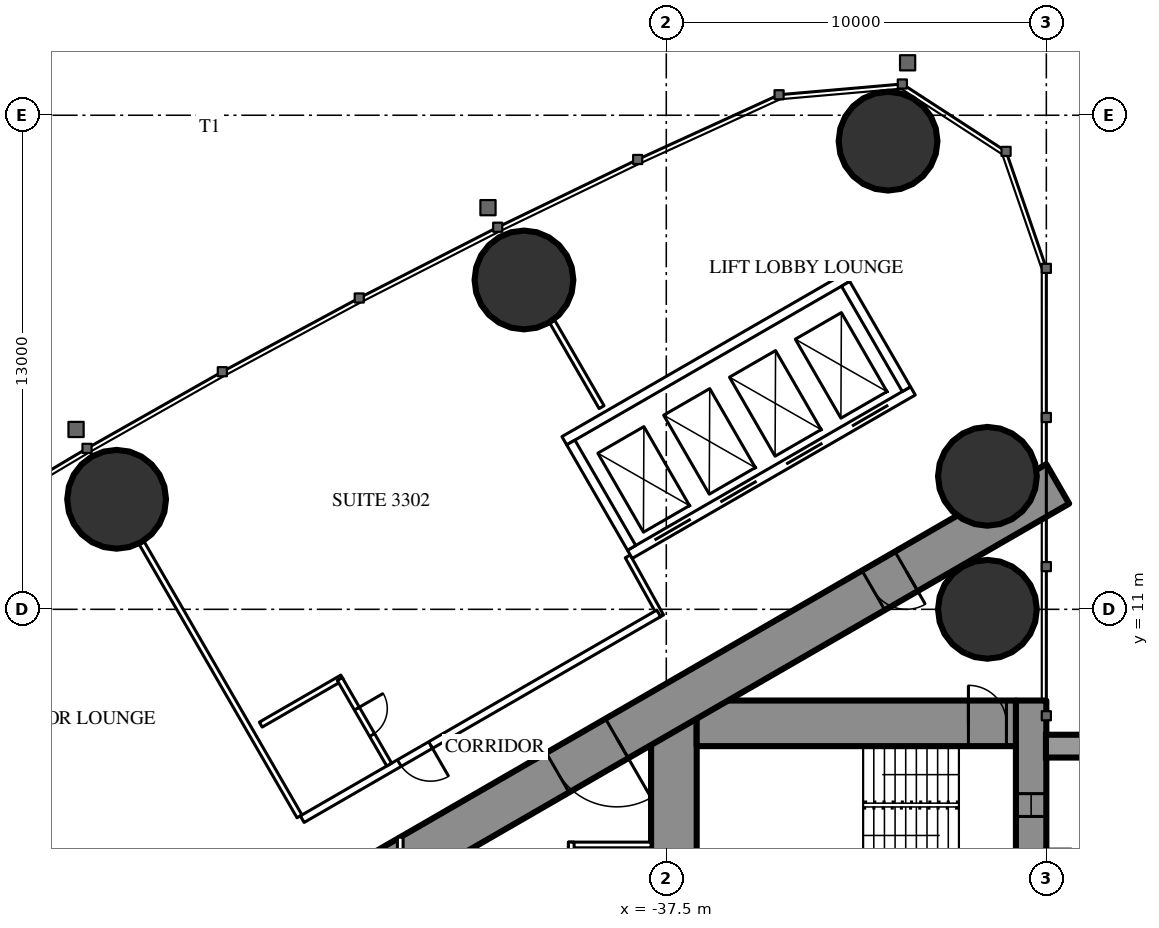
"""IFC4 building model, lengths in metres.
Left out: names, types, materials, properties, quantities, classifications, styles, units other than length and angle.
Written with IfcOpenShell. Run it as: python <this file> out.ifc"""

import sys

from ifc_helpers import new_model, si_unit, direction, frame, frame_2d, origin, origin_2d, place, context, subcontext, project, spatial, rectangle, hollow_circle, extrude, element, fill, save


model = new_model("IFC4")
c1 = context("Model", 3, precision=1e-05, world=origin(), true_north=direction((0.0, 1.0)))
c2 = subcontext(c1, "Body", "Model", "MODEL_VIEW")
j1 = project(units=[si_unit("LENGTHUNIT", "METRE"), si_unit("PLANEANGLEUNIT", "RADIAN")], contexts=[c1])
p1 = place(None, origin())
s1 = spatial("IfcSite", under=j1, at=p1, CompositionType="ELEMENT")
p2 = place(p1, origin())
s2 = spatial("IfcBuilding", under=s1, at=p2, CompositionType="ELEMENT")
p3 = place(p2, frame((0.0, 0.0, 125.6)))
s3 = spatial("IfcBuildingStorey", under=s2, at=p3, CompositionType="ELEMENT", Elevation=125.6)
for number, where, z_axis, x_axis in (
    (1, (-31.665, 23.318, 0.0), (0.0, 0.0, 1.0), (1.0, 0.0, 0.0)),
    (2, (-29.05, 11.0, 0.0), (0.0, 0.0, 1.0), (1.0, 0.0, 0.0)),
    (3, (-29.05, 14.5, 0.0), (0.0, 0.0, 1.0), (1.0, 0.0, 0.0)),
    (4, (-41.245, 19.666, 0.0), (0.0, 0.0, 1.0), (1.0, 0.0, 0.0)),
    (5, (-51.963, 13.895, 0.0), (0.0, 0.0, 1.0), (1.0, 0.0, 0.0)),
):
    element("IfcColumn", number, at=place(p3, frame(where, z_axis=z_axis, x_axis=x_axis)), inside=s3, PredefinedType="COLUMN", context=c2, shape_type="SweptSolid", body=[
        extrude(hollow_circle(Radius=1.3, WallThickness=0.1, at=origin_2d()), origin(), (0.0, 0.0, 1.0), 3.5),
    ])
p4 = place(p3, frame((-27.9, 8.6, 0.0), z_axis=(0.0, 0.0, 1.0), x_axis=(0.0, -1.0, 0.0)))
e6 = element("IfcWall", 6, at=p4, inside=s3, PredefinedType="SHEAR", context=c2, shape_type="SweptSolid", body=[
    extrude(rectangle(XDim=17.2, YDim=0.8, at=frame_2d((8.6, 0.0))), origin(), (0.0, 0.0, 1.0), 3.5),
])
p5 = place(p4, frame((2.45, 0.0, 0.6)))
e7 = element("IfcOpeningElement", 7, at=p5, cuts=e6, PredefinedType="OPENING", context=c2, shape_type="SweptSolid", body=[
    extrude(rectangle(XDim=0.6, YDim=2.1, at=frame_2d((0.3, 1.05))), frame((0.0, 0.41, 0.0), z_axis=(0.0, -1.0, 0.0), x_axis=(1.0, 0.0, 0.0)), (0.0, 0.0, 1.0), 0.82),
])
p6 = place(p4, frame((14.15, 0.0, 0.6)))
e8 = element("IfcOpeningElement", 8, at=p6, cuts=e6, PredefinedType="OPENING", context=c2, shape_type="SweptSolid", body=[
    extrude(rectangle(XDim=0.6, YDim=2.1, at=frame_2d((0.3, 1.05))), frame((0.0, 0.41, 0.0), z_axis=(0.0, -1.0, 0.0), x_axis=(1.0, 0.0, 0.0)), (0.0, 0.0, 1.0), 0.82),
])
p7 = place(p3, frame((-37.3, 8.6, 0.0), z_axis=(0.0, 0.0, 1.0), x_axis=(0.0, -1.0, 0.0)))
e9 = element("IfcWall", 9, at=p7, inside=s3, PredefinedType="SHEAR", context=c2, shape_type="SweptSolid", body=[
    extrude(rectangle(XDim=17.2, YDim=1.2, at=frame_2d((8.6, 0.0))), origin(), (0.0, 0.0, 1.0), 3.5),
])
p8 = place(p7, frame((7.7, 0.0, 0.0)))
e10 = element("IfcOpeningElement", 10, at=p8, cuts=e9, PredefinedType="OPENING", context=c2, shape_type="SweptSolid", body=[
    extrude(rectangle(XDim=1.8, YDim=2.2, at=frame_2d((0.9, 1.1))), frame((0.0, 0.61, 0.0), z_axis=(0.0, -1.0, 0.0), x_axis=(1.0, 0.0, 0.0)), (0.0, 0.0, 1.0), 1.22),
])
p9 = place(p3, frame((-28.3, 8.0, 0.0), z_axis=(0.0, 0.0, 1.0), x_axis=(-1.0, 0.0, 0.0)))
e11 = element("IfcWall", 11, at=p9, inside=s3, PredefinedType="SHEAR", context=c2, shape_type="SweptSolid", body=[
    extrude(rectangle(XDim=8.4, YDim=1.2, at=frame_2d((4.2, 0.0))), origin(), (0.0, 0.0, 1.0), 3.5),
])
p10 = place(p9, frame((0.25, 0.0, 0.0)))
e12 = element("IfcOpeningElement", 12, at=p10, cuts=e11, PredefinedType="OPENING", context=c2, shape_type="SweptSolid", body=[
    extrude(rectangle(XDim=1.0, YDim=2.2, at=frame_2d((0.5, 1.1))), frame((0.0, 0.61, 0.0), z_axis=(0.0, -1.0, 0.0), x_axis=(1.0, 0.0, 0.0)), (0.0, 0.0, 1.0), 1.22),
])
p11 = place(p3, frame((-27.2, 14.3, 0.0), z_axis=(0.0, 0.0, 1.0), x_axis=(-0.866026593062, -0.499997940104, 0.0)))
e13 = element("IfcWall", 13, at=p11, inside=s3, PredefinedType="SHEAR", context=c2, shape_type="SweptSolid", body=[
    extrude(rectangle(XDim=28.946, YDim=1.2, at=frame_2d((14.473, 0.0))), origin(), (0.0, 0.0, 1.0), 3.5),
])
p12 = place(p11, frame((4.6, 0.0, 0.0)))
e14 = element("IfcOpeningElement", 14, at=p12, cuts=e13, PredefinedType="OPENING", context=c2, shape_type="SweptSolid", body=[
    extrude(rectangle(XDim=1.0, YDim=2.2, at=frame_2d((0.5, 1.1))), frame((0.0, 0.61, 0.0), z_axis=(0.0, -1.0, 0.0), x_axis=(1.0, 0.0, 0.0)), (0.0, 0.0, 1.0), 1.22),
])
p13 = place(p11, frame((13.395, 0.0, 0.0)))
e15 = element("IfcOpeningElement", 15, at=p13, cuts=e13, PredefinedType="OPENING", context=c2, shape_type="SweptSolid", body=[
    extrude(rectangle(XDim=1.8, YDim=2.2, at=frame_2d((0.9, 1.1))), frame((0.0, 0.61, 0.0), z_axis=(0.0, -1.0, 0.0), x_axis=(1.0, 0.0, 0.0)), (0.0, 0.0, 1.0), 1.22),
])
p14 = place(p3, frame((-47.151, 5.552, 0.0), z_axis=(0.0, 0.0, 1.0), x_axis=(-0.500003012045, 0.866023664773, 0.0)))
e16 = element("IfcWall", 16, at=p14, inside=s3, PredefinedType="PARTITIONING", context=c2, shape_type="SweptSolid", body=[
    extrude(rectangle(XDim=8.311, YDim=0.15, at=frame_2d((4.156, 0.0))), origin(), (0.0, 0.0, 1.0), 2.2),
])
p15 = place(p3, frame((-39.202, 16.32, 0.0), z_axis=(0.0, 0.0, 1.0), x_axis=(-0.499947391036, 0.866055775454, 0.0)))
e17 = element("IfcWall", 17, at=p15, inside=s3, PredefinedType="PARTITIONING", context=c2, shape_type="SweptSolid", body=[
    extrude(rectangle(XDim=2.599, YDim=0.15, at=frame_2d((1.3, 0.0))), origin(), (0.0, 0.0, 1.0), 3.25),
])
p16 = place(p3, frame((-38.513, 12.392, 0.0), z_axis=(0.0, 0.0, 1.0), x_axis=(0.485585508183, -0.874189175317, 0.0)))
e18 = element("IfcWall", 18, at=p16, inside=s3, PredefinedType="PARTITIONING", context=c2, shape_type="SweptSolid", body=[
    extrude(rectangle(XDim=1.805, YDim=0.15, at=frame_2d((0.902, 0.0))), origin(), (0.0, 0.0, 1.0), 3.25),
])
p17 = place(p3, frame((-37.7, 10.894, 0.0), z_axis=(0.0, 0.0, 1.0), x_axis=(-0.866027551079, -0.499996280759, 0.0)))
e19 = element("IfcWall", 19, at=p17, inside=s3, PredefinedType="PARTITIONING", context=c2, shape_type="SweptSolid", body=[
    extrude(rectangle(XDim=10.831, YDim=0.2, at=frame_2d((5.415, 0.0))), origin(), (0.0, 0.0, 1.0), 3.25),
])
p18 = place(p17, frame((6.93, 0.0, 0.0)))
e20 = element("IfcOpeningElement", 20, at=p18, cuts=e19, PredefinedType="OPENING", context=c2, shape_type="SweptSolid", body=[
    extrude(rectangle(XDim=0.95, YDim=2.2, at=frame_2d((0.475, 1.1))), frame((0.0, 0.11, 0.0), z_axis=(0.0, -1.0, 0.0), x_axis=(1.0, 0.0, 0.0)), (0.0, 0.0, 1.0), 0.22),
])
p19 = place(p3, frame((-46.026, 9.204, 0.0), z_axis=(0.0, 0.0, 1.0), x_axis=(-0.866006523861, -0.500032699561, 0.0)))
e21 = element("IfcWall", 21, at=p19, inside=s3, PredefinedType="PARTITIONING", context=c2, shape_type="SweptSolid", body=[
    extrude(rectangle(XDim=2.475, YDim=0.15, at=frame_2d((1.237, 0.0))), origin(), (0.0, 0.0, 1.0), 3.25),
])
p20 = place(p3, frame((-44.791, 6.915, 0.0), z_axis=(0.0, 0.0, 1.0), x_axis=(-0.500047596559, 0.865997922154, 0.0)))
e22 = element("IfcWall", 22, at=p20, inside=s3, PredefinedType="PARTITIONING", context=c2, shape_type="SweptSolid", body=[
    extrude(rectangle(XDim=2.6, YDim=0.15, at=frame_2d((1.3, 0.0))), origin(), (0.0, 0.0, 1.0), 3.25),
])
p21 = place(p20, frame((0.9, 0.0, 0.0)))
e23 = element("IfcOpeningElement", 23, at=p21, cuts=e22, PredefinedType="OPENING", context=c2, shape_type="SweptSolid", body=[
    extrude(rectangle(XDim=0.8, YDim=2.2, at=frame_2d((0.4, 1.1))), frame((0.0, 0.085, 0.0), z_axis=(0.0, -1.0, 0.0), x_axis=(1.0, 0.0, 0.0)), (0.0, 0.0, 1.0), 0.17),
])
p22 = place(p3, frame((-37.9, 4.8, 0.0), z_axis=(0.0, 0.0, 1.0), x_axis=(-1.0, 0.0, 0.0)))
e24 = element("IfcWall", 24, at=p22, inside=s3, PredefinedType="PARTITIONING", context=c2, shape_type="SweptSolid", body=[
    extrude(rectangle(XDim=2.175, YDim=0.15, at=frame_2d((1.087, 0.0))), origin(), (0.0, 0.0, 1.0), 3.25),
])
p23 = place(p3, frame((-40.0, 4.875, 0.0), z_axis=(0.0, 0.0, 1.0), x_axis=(0.0, -1.0, 0.0)))
e25 = element("IfcWall", 25, at=p23, inside=s3, PredefinedType="PARTITIONING", context=c2, shape_type="SweptSolid", body=[
    extrude(rectangle(XDim=2.55, YDim=0.15, at=frame_2d((1.275, 0.0))), origin(), (0.0, 0.0, 1.0), 3.25),
])
p24 = place(p23, frame((0.775, 0.0, 0.0)))
e26 = element("IfcOpeningElement", 26, at=p24, cuts=e25, PredefinedType="OPENING", context=c2, shape_type="SweptSolid", body=[
    extrude(rectangle(XDim=1.0, YDim=2.2, at=frame_2d((0.5, 1.1))), frame((0.0, 0.085, 0.0), z_axis=(0.0, -1.0, 0.0), x_axis=(1.0, 0.0, 0.0)), (0.0, 0.0, 1.0), 0.17),
])
p25 = place(p3, frame((-44.5, 5.005, 0.0), z_axis=(0.0, 0.0, 1.0), x_axis=(0.0, -1.0, 0.0)))
e27 = element("IfcWall", 27, at=p25, inside=s3, PredefinedType="PARTITIONING", context=c2, shape_type="SweptSolid", body=[
    extrude(rectangle(XDim=10.009, YDim=0.15, at=frame_2d((5.005, 0.0))), origin(), (0.0, 0.0, 1.0), 2.45),
])
p26 = place(p25, frame((2.002, 0.0, 0.0)))
e28 = element("IfcOpeningElement", 28, at=p26, cuts=e27, PredefinedType="OPENING", context=c2, shape_type="SweptSolid", body=[
    extrude(rectangle(XDim=1.0, YDim=2.2, at=frame_2d((0.5, 1.1))), frame((0.0, 0.085, 0.0), z_axis=(0.0, -1.0, 0.0), x_axis=(1.0, 0.0, 0.0)), (0.0, 0.0, 1.0), 0.17),
])
p27 = place(p25, frame((7.007, 0.0, 0.0)))
e29 = element("IfcOpeningElement", 29, at=p27, cuts=e27, PredefinedType="OPENING", context=c2, shape_type="SweptSolid", body=[
    extrude(rectangle(XDim=1.0, YDim=2.2, at=frame_2d((0.5, 1.1))), frame((0.0, 0.085, 0.0), z_axis=(0.0, -1.0, 0.0), x_axis=(1.0, 0.0, 0.0)), (0.0, 0.0, 1.0), 0.17),
])
p28 = place(p3, frame((-31.01, 16.747, 0.0), z_axis=(0.0, 0.0, 1.0), x_axis=(-0.866028165386, -0.499995216735, 0.0)))
e30 = element("IfcWall", 30, at=p28, inside=s3, PredefinedType="PARTITIONING", context=c2, shape_type="SweptSolid", body=[
    extrude(rectangle(XDim=8.6, YDim=0.25, at=frame_2d((4.3, 0.0))), origin(), (0.0, 0.0, 1.0), 3.25),
])
p29 = place(p28, frame((0.75, 0.0, 0.0)))
e31 = element("IfcOpeningElement", 31, at=p29, cuts=e30, PredefinedType="OPENING", context=c2, shape_type="SweptSolid", body=[
    extrude(rectangle(XDim=1.1, YDim=2.2, at=frame_2d((0.55, 1.1))), frame((0.0, 0.135, 0.0), z_axis=(0.0, -1.0, 0.0), x_axis=(1.0, 0.0, 0.0)), (0.0, 0.0, 1.0), 0.27),
])
p30 = place(p28, frame((2.75, 0.0, 0.0)))
e32 = element("IfcOpeningElement", 32, at=p30, cuts=e30, PredefinedType="OPENING", context=c2, shape_type="SweptSolid", body=[
    extrude(rectangle(XDim=1.1, YDim=2.2, at=frame_2d((0.55, 1.1))), frame((0.0, 0.135, 0.0), z_axis=(0.0, -1.0, 0.0), x_axis=(1.0, 0.0, 0.0)), (0.0, 0.0, 1.0), 0.27),
])
p31 = place(p28, frame((4.75, 0.0, 0.0)))
e33 = element("IfcOpeningElement", 33, at=p31, cuts=e30, PredefinedType="OPENING", context=c2, shape_type="SweptSolid", body=[
    extrude(rectangle(XDim=1.1, YDim=2.2, at=frame_2d((0.55, 1.1))), frame((0.0, 0.135, 0.0), z_axis=(0.0, -1.0, 0.0), x_axis=(1.0, 0.0, 0.0)), (0.0, 0.0, 1.0), 0.27),
])
p32 = place(p28, frame((6.75, 0.0, 0.0)))
e34 = element("IfcOpeningElement", 34, at=p32, cuts=e30, PredefinedType="OPENING", context=c2, shape_type="SweptSolid", body=[
    extrude(rectangle(XDim=1.1, YDim=2.2, at=frame_2d((0.55, 1.1))), frame((0.0, 0.135, 0.0), z_axis=(0.0, -1.0, 0.0), x_axis=(1.0, 0.0, 0.0)), (0.0, 0.0, 1.0), 0.27),
])
p33 = place(p3, frame((-32.736, 19.736, 0.0), z_axis=(0.0, 0.0, 1.0), x_axis=(-0.866028165386, -0.499995216735, 0.0)))
e35 = element("IfcWall", 35, at=p33, inside=s3, PredefinedType="PARTITIONING", context=c2, shape_type="SweptSolid", body=[
    extrude(rectangle(XDim=8.6, YDim=0.25, at=frame_2d((4.3, 0.0))), origin(), (0.0, 0.0, 1.0), 3.25),
])
p34 = place(p3, frame((-31.181, 16.793, 0.0), z_axis=(0.0, 0.0, 1.0), x_axis=(-0.499929347863, 0.866066190972, 0.0)))
e36 = element("IfcWall", 36, at=p34, inside=s3, PredefinedType="PARTITIONING", context=c2, shape_type="SweptSolid", body=[
    extrude(rectangle(XDim=3.201, YDim=0.25, at=frame_2d((1.6, 0.0))), origin(), (0.0, 0.0, 1.0), 3.25),
])
p35 = place(p3, frame((-38.413, 12.618, 0.0), z_axis=(0.0, 0.0, 1.0), x_axis=(-0.499872130319, 0.866099216793, 0.0)))
e37 = element("IfcWall", 37, at=p35, inside=s3, PredefinedType="PARTITIONING", context=c2, shape_type="SweptSolid", body=[
    extrude(rectangle(XDim=3.2, YDim=0.25, at=frame_2d((1.6, 0.0))), origin(), (0.0, 0.0, 1.0), 3.25),
])
p36 = place(p21, origin())
e38 = element("IfcDoor", 38, at=p36, inside=s3, OperationType="SINGLE_SWING_RIGHT", PredefinedType="DOOR", context=c2, shape_type="SweptSolid", body=[
    extrude(rectangle(XDim=0.8, YDim=2.2, at=frame_2d((0.4, 1.1))), frame((0.0, 0.025, 0.0), z_axis=(0.0, -1.0, 0.0), x_axis=(1.0, 0.0, 0.0)), (0.0, 0.0, 1.0), 0.05),
])
fill(e23, e38)
p37 = place(p18, origin())
e39 = element("IfcDoor", 39, at=p37, inside=s3, OperationType="SINGLE_SWING_LEFT", PredefinedType="DOOR", context=c2, shape_type="SweptSolid", body=[
    extrude(rectangle(XDim=0.95, YDim=2.2, at=frame_2d((0.475, 1.1))), frame((0.0, 0.025, 0.0), z_axis=(0.0, -1.0, 0.0), x_axis=(1.0, 0.0, 0.0)), (0.0, 0.0, 1.0), 0.05),
])
fill(e20, e39)
p38 = place(p12, origin())
e40 = element("IfcDoor", 40, at=p38, inside=s3, OperationType="SINGLE_SWING_LEFT", PredefinedType="DOOR", context=c2, shape_type="SweptSolid", body=[
    extrude(rectangle(XDim=1.0, YDim=2.2, at=frame_2d((0.5, 1.1))), frame((0.0, 0.025, 0.0), z_axis=(0.0, -1.0, 0.0), x_axis=(1.0, 0.0, 0.0)), (0.0, 0.0, 1.0), 0.05),
])
fill(e14, e40)
p39 = place(p13, origin())
e41 = element("IfcDoor", 41, at=p39, inside=s3, OperationType="DOUBLE_DOOR_SINGLE_SWING", PredefinedType="DOOR", context=c2, shape_type="SweptSolid", body=[
    extrude(rectangle(XDim=1.8, YDim=2.2, at=frame_2d((0.9, 1.1))), frame((0.0, 0.025, 0.0), z_axis=(0.0, -1.0, 0.0), x_axis=(1.0, 0.0, 0.0)), (0.0, 0.0, 1.0), 0.05),
])
fill(e15, e41)
p40 = place(p10, origin())
e42 = element("IfcDoor", 42, at=p40, inside=s3, OperationType="SINGLE_SWING_RIGHT", PredefinedType="DOOR", context=c2, shape_type="SweptSolid", body=[
    extrude(rectangle(XDim=1.0, YDim=2.2, at=frame_2d((0.5, 1.1))), frame((0.0, 0.025, 0.0), z_axis=(0.0, -1.0, 0.0), x_axis=(1.0, 0.0, 0.0)), (0.0, 0.0, 1.0), 0.05),
])
fill(e12, e42)
p41 = place(p29, origin())
e43 = element("IfcDoor", 43, at=p41, inside=s3, OperationType="DOUBLE_DOOR_SLIDING", PredefinedType="USERDEFINED", context=c2, shape_type="SweptSolid", body=[
    extrude(rectangle(XDim=1.1, YDim=2.2, at=frame_2d((0.55, 1.1))), frame((0.0, 0.025, 0.0), z_axis=(0.0, -1.0, 0.0), x_axis=(1.0, 0.0, 0.0)), (0.0, 0.0, 1.0), 0.05),
])
fill(e31, e43)
p42 = place(p30, origin())
e44 = element("IfcDoor", 44, at=p42, inside=s3, OperationType="DOUBLE_DOOR_SLIDING", PredefinedType="USERDEFINED", context=c2, shape_type="SweptSolid", body=[
    extrude(rectangle(XDim=1.1, YDim=2.2, at=frame_2d((0.55, 1.1))), frame((0.0, 0.025, 0.0), z_axis=(0.0, -1.0, 0.0), x_axis=(1.0, 0.0, 0.0)), (0.0, 0.0, 1.0), 0.05),
])
fill(e32, e44)
p43 = place(p31, origin())
e45 = element("IfcDoor", 45, at=p43, inside=s3, OperationType="DOUBLE_DOOR_SLIDING", PredefinedType="USERDEFINED", context=c2, shape_type="SweptSolid", body=[
    extrude(rectangle(XDim=1.1, YDim=2.2, at=frame_2d((0.55, 1.1))), frame((0.0, 0.025, 0.0), z_axis=(0.0, -1.0, 0.0), x_axis=(1.0, 0.0, 0.0)), (0.0, 0.0, 1.0), 0.05),
])
fill(e33, e45)
p44 = place(p32, origin())
e46 = element("IfcDoor", 46, at=p44, inside=s3, OperationType="DOUBLE_DOOR_SLIDING", PredefinedType="USERDEFINED", context=c2, shape_type="SweptSolid", body=[
    extrude(rectangle(XDim=1.1, YDim=2.2, at=frame_2d((0.55, 1.1))), frame((0.0, 0.025, 0.0), z_axis=(0.0, -1.0, 0.0), x_axis=(1.0, 0.0, 0.0)), (0.0, 0.0, 1.0), 0.05),
])
fill(e34, e46)
p45 = place(p5, origin())
e47 = element("IfcWindow", 47, at=p45, inside=s3, PartitioningType="SINGLE_PANEL", PredefinedType="WINDOW", context=c2, shape_type="SweptSolid", body=[
    extrude(rectangle(XDim=0.6, YDim=2.1, at=frame_2d((0.3, 1.05))), frame((0.0, 0.03, 0.0), z_axis=(0.0, -1.0, 0.0), x_axis=(1.0, 0.0, 0.0)), (0.0, 0.0, 1.0), 0.06),
])
fill(e7, e47)
save(model, sys.argv[1])
